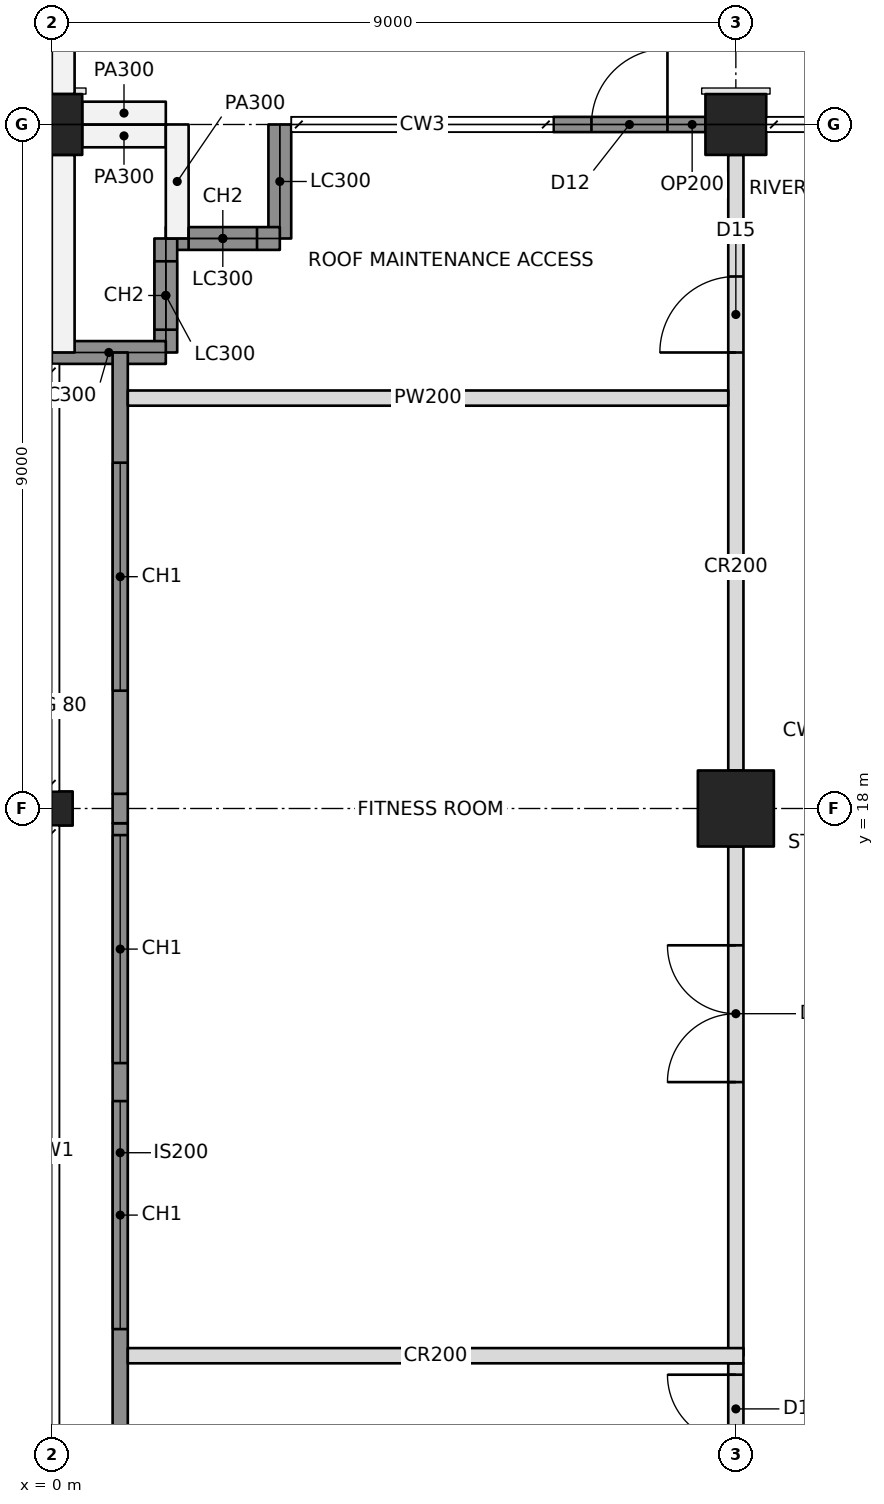
"""IFC4 building model, lengths in metres.
Left out: names, types, materials, properties, quantities, classifications, styles, units other than length and angle.
Written with IfcOpenShell. Run it as: python <this file> out.ifc"""

import sys

from ifc_helpers import new_model, si_unit, direction, frame, frame_2d, origin, origin_2d, place, context, subcontext, project, spatial, rectangle, hollow_rectangle, i_section, extrude, element, fill, save


model = new_model("IFC4")
c1 = context("Model", 3, precision=1e-05, world=origin(), true_north=direction((0.0, 1.0)))
c2 = subcontext(c1, "Body", "Model", "MODEL_VIEW")
j1 = project(units=[si_unit("LENGTHUNIT", "METRE"), si_unit("PLANEANGLEUNIT", "RADIAN")], contexts=[c1])
p1 = place(None, origin())
s1 = spatial("IfcSite", under=j1, at=p1, CompositionType="ELEMENT")
p2 = place(p1, origin())
s2 = spatial("IfcBuilding", under=s1, at=p2, CompositionType="ELEMENT")
p3 = place(p2, frame((0.0, 0.0, 160.4)))
s3 = spatial("IfcBuildingStorey", under=s2, at=p3, CompositionType="ELEMENT", Elevation=160.4)
p4 = place(p3, frame((0.0, 18.0, 0.0), z_axis=(0.0, 0.0, 1.0), x_axis=(0.0, 1.0, 0.0)))
e1 = element("IfcColumn", 1, at=p4, inside=s3, PredefinedType="COLUMN", context=c2, shape_type="SweptSolid", body=[
    extrude(i_section(OverallWidth=0.449, OverallDepth=0.549, WebThickness=0.072, FlangeThickness=0.115, at=origin_2d()), origin(), (0.0, 0.0, 1.0), 3.4),
])
p5 = place(p3, frame((0.0, 27.0, 0.0), z_axis=(0.0, 0.0, 1.0), x_axis=(0.0, 1.0, 0.0)))
e2 = element("IfcColumn", 2, at=p5, inside=s3, PredefinedType="COLUMN", context=c2, shape_type="SweptSolid", body=[
    extrude(hollow_rectangle(XDim=0.8, YDim=0.8, WallThickness=0.07, at=origin_2d()), origin(), (0.0, 0.0, 1.0), 3.4),
])
p6 = place(p3, frame((9.0, 18.0, 0.0), z_axis=(0.0, 0.0, 1.0), x_axis=(1.0, 0.0, 0.0)))
e3 = element("IfcColumn", 3, at=p6, inside=s3, PredefinedType="COLUMN", context=c2, shape_type="SweptSolid", body=[
    extrude(hollow_rectangle(XDim=1.0, YDim=1.0, WallThickness=0.1, at=origin_2d()), origin(), (0.0, 0.0, 1.0), 3.4),
])
p7 = place(p3, frame((9.0, 27.0, 0.0), z_axis=(0.0, 0.0, 1.0), x_axis=(1.0, 0.0, 0.0)))
e4 = element("IfcColumn", 4, at=p7, inside=s3, PredefinedType="COLUMN", context=c2, shape_type="SweptSolid", body=[
    extrude(hollow_rectangle(XDim=0.8, YDim=0.8, WallThickness=0.07, at=origin_2d()), origin(), (0.0, 0.0, 1.0), 3.4),
])
p8 = place(p3, frame((3.0, 27.0, 0.0), z_axis=(0.0, 0.0, 1.0), x_axis=(0.0, -1.0, 0.0)))
e5 = element("IfcWall", 5, at=p8, inside=s3, PredefinedType="SOLIDWALL", context=c2, shape_type="SweptSolid", body=[
    extrude(rectangle(XDim=1.5, YDim=0.3, at=frame_2d((0.75, 0.0))), origin(), (0.0, 0.0, 1.0), 2.42),
])
p9 = place(p3, frame((3.0, 25.5, 0.0), z_axis=(0.0, 0.0, 1.0), x_axis=(-1.0, 0.0, 0.0)))
e6 = element("IfcWall", 6, at=p9, inside=s3, PredefinedType="SOLIDWALL", context=c2, shape_type="SweptSolid", body=[
    extrude(rectangle(XDim=1.5, YDim=0.3, at=frame_2d((0.75, 0.0))), origin(), (0.0, 0.0, 1.0), 3.2),
])
p10 = place(p9, frame((0.3, 0.0, 0.6)))
e7 = element("IfcOpeningElement", 7, at=p10, cuts=e6, PredefinedType="OPENING", context=c2, shape_type="SweptSolid", body=[
    extrude(rectangle(XDim=0.9, YDim=2.2, at=frame_2d((0.45, 1.1))), frame((0.0, 0.16, 0.0), z_axis=(0.0, -1.0, 0.0), x_axis=(1.0, 0.0, 0.0)), (0.0, 0.0, 1.0), 0.32),
])
p11 = place(p3, frame((1.5, 25.5, 0.0), z_axis=(0.0, 0.0, 1.0), x_axis=(0.0, -1.0, 0.0)))
e8 = element("IfcWall", 8, at=p11, inside=s3, PredefinedType="SOLIDWALL", context=c2, shape_type="SweptSolid", body=[
    extrude(rectangle(XDim=1.5, YDim=0.3, at=frame_2d((0.75, 0.0))), origin(), (0.0, 0.0, 1.0), 3.2),
])
p12 = place(p11, frame((0.3, 0.0, 0.6)))
e9 = element("IfcOpeningElement", 9, at=p12, cuts=e8, PredefinedType="OPENING", context=c2, shape_type="SweptSolid", body=[
    extrude(rectangle(XDim=0.9, YDim=2.2, at=frame_2d((0.45, 1.1))), frame((0.0, 0.16, 0.0), z_axis=(0.0, -1.0, 0.0), x_axis=(1.0, 0.0, 0.0)), (0.0, 0.0, 1.0), 0.32),
])
p13 = place(p3, frame((1.5, 24.0, 0.0), z_axis=(0.0, 0.0, 1.0), x_axis=(-1.0, 0.0, 0.0)))
e10 = element("IfcWall", 10, at=p13, inside=s3, PredefinedType="SOLIDWALL", context=c2, shape_type="SweptSolid", body=[
    extrude(rectangle(XDim=1.5, YDim=0.3, at=frame_2d((0.75, 0.0))), origin(), (0.0, 0.0, 1.0), 2.42),
])
p14 = place(p3, frame((6.6, 27.0, 0.0), z_axis=(0.0, 0.0, 1.0), x_axis=(1.0, 0.0, 0.0)))
e11 = element("IfcWall", 11, at=p14, inside=s3, PredefinedType="SOLIDWALL", context=c2, shape_type="SweptSolid", body=[
    extrude(rectangle(XDim=2.0, YDim=0.2, at=frame_2d((1.0, 0.0))), origin(), (0.0, 0.0, 1.0), 2.42),
])
p15 = place(p14, frame((0.5, 0.0, 0.0)))
e12 = element("IfcOpeningElement", 12, at=p15, cuts=e11, PredefinedType="OPENING", context=c2, shape_type="SweptSolid", body=[
    extrude(rectangle(XDim=1.0, YDim=2.1, at=frame_2d((0.5, 1.05))), frame((0.0, 0.11, 0.0), z_axis=(0.0, -1.0, 0.0), x_axis=(1.0, 0.0, 0.0)), (0.0, 0.0, 1.0), 0.22),
])
p16 = place(p3, frame((0.15, 24.0, 0.0), z_axis=(0.0, 0.0, 1.0), x_axis=(0.0, 1.0, 0.0)))
e13 = element("IfcWall", 13, at=p16, inside=s3, PredefinedType="PARAPET", context=c2, shape_type="SweptSolid", body=[
    extrude(rectangle(XDim=2.6, YDim=0.3, at=frame_2d((1.3, 0.0))), origin(), (0.0, 0.0, 1.0), 1.1),
])
p17 = place(p3, frame((0.4, 26.85, 0.0), z_axis=(0.0, 0.0, 1.0), x_axis=(1.0, 0.0, 0.0)))
e14 = element("IfcWall", 14, at=p17, inside=s3, PredefinedType="PARAPET", context=c2, shape_type="SweptSolid", body=[
    extrude(rectangle(XDim=1.1, YDim=0.3, at=frame_2d((0.55, 0.0))), origin(), (0.0, 0.0, 1.0), 1.1),
])
p18 = place(p3, frame((1.65, 25.5, 0.0), z_axis=(0.0, 0.0, 1.0), x_axis=(0.0, 1.0, 0.0)))
e15 = element("IfcWall", 15, at=p18, inside=s3, PredefinedType="PARAPET", context=c2, shape_type="SweptSolid", body=[
    extrude(rectangle(XDim=1.5, YDim=0.3, at=frame_2d((0.75, 0.0))), origin(), (0.0, 0.0, 1.0), 1.1),
])
p19 = place(p3, frame((1.5, 27.15, 0.0), z_axis=(0.0, 0.0, 1.0), x_axis=(-1.0, 0.0, 0.0)))
e16 = element("IfcWall", 16, at=p19, inside=s3, PredefinedType="PARAPET", context=c2, shape_type="SweptSolid", body=[
    extrude(rectangle(XDim=1.1, YDim=0.3, at=frame_2d((0.55, 0.0))), origin(), (0.0, 0.0, 1.0), 1.1),
])
p20 = place(p3, frame((0.15, 27.4, 0.0), z_axis=(0.0, 0.0, 1.0), x_axis=(0.0, 1.0, 0.0)))
e17 = element("IfcWall", 17, at=p20, inside=s3, PredefinedType="PARAPET", context=c2, shape_type="SweptSolid", body=[
    extrude(rectangle(XDim=5.6, YDim=0.3, at=frame_2d((2.8, 0.0))), origin(), (0.0, 0.0, 1.0), 1.1),
])
p21 = place(p3, frame((9.0, 10.8, 0.0), z_axis=(0.0, 0.0, 1.0), x_axis=(0.0, 1.0, 0.0)))
e18 = element("IfcWall", 18, at=p21, inside=s3, PredefinedType="PARTITIONING", context=c2, shape_type="SweptSolid", body=[
    extrude(rectangle(XDim=6.7, YDim=0.2, at=frame_2d((3.35, 0.0))), origin(), (0.0, 0.0, 1.0), 2.405),
])
p22 = place(p21, frame((3.6, 0.0, 0.0)))
e19 = element("IfcOpeningElement", 19, at=p22, cuts=e18, PredefinedType="OPENING", context=c2, shape_type="SweptSolid", body=[
    extrude(rectangle(XDim=1.8, YDim=2.4, at=frame_2d((0.9, 1.2))), frame((0.0, 0.11, 0.0), z_axis=(0.0, -1.0, 0.0), x_axis=(1.0, 0.0, 0.0)), (0.0, 0.0, 1.0), 0.22),
])
p23 = place(p3, frame((9.0, 18.5, 0.0), z_axis=(0.0, 0.0, 1.0), x_axis=(0.0, 1.0, 0.0)))
e20 = element("IfcWall", 20, at=p23, inside=s3, PredefinedType="PARTITIONING", context=c2, shape_type="SweptSolid", body=[
    extrude(rectangle(XDim=8.1, YDim=0.2, at=frame_2d((4.05, 0.0))), origin(), (0.0, 0.0, 1.0), 2.405),
])
p24 = place(p23, frame((5.5, 0.0, 0.0)))
e21 = element("IfcOpeningElement", 21, at=p24, cuts=e20, PredefinedType="OPENING", context=c2, shape_type="SweptSolid", body=[
    extrude(rectangle(XDim=1.0, YDim=2.1, at=frame_2d((0.5, 1.05))), frame((0.0, 0.11, 0.0), z_axis=(0.0, -1.0, 0.0), x_axis=(1.0, 0.0, 0.0)), (0.0, 0.0, 1.0), 0.22),
])
p25 = place(p3, frame((1.0, 10.8, 0.0), z_axis=(0.0, 0.0, 1.0), x_axis=(1.0, 0.0, 0.0)))
e22 = element("IfcWall", 22, at=p25, inside=s3, PredefinedType="PARTITIONING", context=c2, shape_type="SweptSolid", body=[
    extrude(rectangle(XDim=8.1, YDim=0.2, at=frame_2d((4.05, 0.0))), origin(), (0.0, 0.0, 1.0), 2.404),
])
p26 = place(p3, frame((9.0, 9.5, 0.0), z_axis=(0.0, 0.0, 1.0), x_axis=(0.0, 1.0, 0.0)))
e23 = element("IfcWall", 23, at=p26, inside=s3, PredefinedType="PARTITIONING", context=c2, shape_type="SweptSolid", body=[
    extrude(rectangle(XDim=1.2, YDim=0.2, at=frame_2d((0.6, 0.0))), origin(), (0.0, 0.0, 1.0), 2.405),
])
p27 = place(p26, frame((0.15, 0.0, 0.0)))
e24 = element("IfcOpeningElement", 24, at=p27, cuts=e23, PredefinedType="OPENING", context=c2, shape_type="SweptSolid", body=[
    extrude(rectangle(XDim=0.9, YDim=2.1, at=frame_2d((0.45, 1.05))), frame((0.0, 0.11, 0.0), z_axis=(0.0, -1.0, 0.0), x_axis=(1.0, 0.0, 0.0)), (0.0, 0.0, 1.0), 0.22),
])
p28 = place(p3, frame((8.9, 23.4, 0.0), z_axis=(0.0, 0.0, 1.0), x_axis=(-1.0, 0.0, 0.0)))
e25 = element("IfcWall", 25, at=p28, inside=s3, PredefinedType="PARTITIONING", context=c2, shape_type="SweptSolid", body=[
    extrude(rectangle(XDim=7.9, YDim=0.2, at=frame_2d((3.95, 0.0))), origin(), (0.0, 0.0, 1.0), 2.404),
])
p29 = place(p3, frame((0.9, 9.135, 0.0), z_axis=(0.0, 0.0, 1.0), x_axis=(0.0, 1.0, 0.0)))
e26 = element("IfcWall", 26, at=p29, inside=s3, PredefinedType="SOLIDWALL", context=c2, shape_type="SweptSolid", body=[
    extrude(rectangle(XDim=8.671, YDim=0.2, at=frame_2d((4.335, 0.0))), origin(), (0.0, 0.0, 1.0), 3.2),
])
p30 = place(p29, frame((2.015, 0.0, 0.6)))
e27 = element("IfcOpeningElement", 27, at=p30, cuts=e26, PredefinedType="OPENING", context=c2, shape_type="SweptSolid", body=[
    extrude(rectangle(XDim=3.0, YDim=2.2, at=frame_2d((1.5, 1.1))), frame((0.0, 0.11, 0.0), z_axis=(0.0, -1.0, 0.0), x_axis=(1.0, 0.0, 0.0)), (0.0, 0.0, 1.0), 0.22),
])
p31 = place(p29, frame((5.515, 0.0, 0.6)))
e28 = element("IfcOpeningElement", 28, at=p31, cuts=e26, PredefinedType="OPENING", context=c2, shape_type="SweptSolid", body=[
    extrude(rectangle(XDim=3.0, YDim=2.2, at=frame_2d((1.5, 1.1))), frame((0.0, 0.11, 0.0), z_axis=(0.0, -1.0, 0.0), x_axis=(1.0, 0.0, 0.0)), (0.0, 0.0, 1.0), 0.22),
])
p32 = place(p3, frame((0.9, 17.806, 0.0), z_axis=(0.0, 0.0, 1.0), x_axis=(0.0, 1.0, 0.0)))
e29 = element("IfcWall", 29, at=p32, inside=s3, PredefinedType="SOLIDWALL", context=c2, shape_type="SweptSolid", body=[
    extrude(rectangle(XDim=0.388, YDim=0.2, at=frame_2d((0.194, 0.0))), origin(), (0.0, 0.0, 1.0), 2.404),
])
p33 = place(p3, frame((0.9, 18.194, 0.0), z_axis=(0.0, 0.0, 1.0), x_axis=(0.0, 1.0, 0.0)))
e30 = element("IfcWall", 30, at=p33, inside=s3, PredefinedType="SOLIDWALL", context=c2, shape_type="SweptSolid", body=[
    extrude(rectangle(XDim=5.806, YDim=0.2, at=frame_2d((2.903, 0.0))), origin(), (0.0, 0.0, 1.0), 3.2),
])
p34 = place(p33, frame((1.356, 0.0, 0.6)))
e31 = element("IfcOpeningElement", 31, at=p34, cuts=e30, PredefinedType="OPENING", context=c2, shape_type="SweptSolid", body=[
    extrude(rectangle(XDim=3.0, YDim=2.2, at=frame_2d((1.5, 1.1))), frame((0.0, 0.11, 0.0), z_axis=(0.0, -1.0, 0.0), x_axis=(1.0, 0.0, 0.0)), (0.0, 0.0, 1.0), 0.22),
])
p35 = place(p10, origin())
e32 = element("IfcWindow", 32, at=p35, inside=s3, PartitioningType="SINGLE_PANEL", PredefinedType="WINDOW", context=c2, shape_type="SweptSolid", body=[
    extrude(rectangle(XDim=0.9, YDim=2.2, at=frame_2d((0.45, 1.1))), frame((0.0, 0.03, 0.0), z_axis=(0.0, -1.0, 0.0), x_axis=(1.0, 0.0, 0.0)), (0.0, 0.0, 1.0), 0.06),
])
fill(e7, e32)
p36 = place(p12, origin())
e33 = element("IfcWindow", 33, at=p36, inside=s3, PartitioningType="SINGLE_PANEL", PredefinedType="WINDOW", context=c2, shape_type="SweptSolid", body=[
    extrude(rectangle(XDim=0.9, YDim=2.2, at=frame_2d((0.45, 1.1))), frame((0.0, 0.03, 0.0), z_axis=(0.0, -1.0, 0.0), x_axis=(1.0, 0.0, 0.0)), (0.0, 0.0, 1.0), 0.06),
])
fill(e9, e33)
p37 = place(p30, origin())
e34 = element("IfcWindow", 34, at=p37, inside=s3, PartitioningType="TRIPLE_PANEL_VERTICAL", PredefinedType="WINDOW", context=c2, shape_type="SweptSolid", body=[
    extrude(rectangle(XDim=3.0, YDim=2.2, at=frame_2d((1.5, 1.1))), frame((0.0, 0.03, 0.0), z_axis=(0.0, -1.0, 0.0), x_axis=(1.0, 0.0, 0.0)), (0.0, 0.0, 1.0), 0.06),
])
fill(e27, e34)
p38 = place(p31, origin())
e35 = element("IfcWindow", 35, at=p38, inside=s3, PartitioningType="TRIPLE_PANEL_VERTICAL", PredefinedType="WINDOW", context=c2, shape_type="SweptSolid", body=[
    extrude(rectangle(XDim=3.0, YDim=2.2, at=frame_2d((1.5, 1.1))), frame((0.0, 0.03, 0.0), z_axis=(0.0, -1.0, 0.0), x_axis=(1.0, 0.0, 0.0)), (0.0, 0.0, 1.0), 0.06),
])
fill(e28, e35)
p39 = place(p34, origin())
e36 = element("IfcWindow", 36, at=p39, inside=s3, PartitioningType="TRIPLE_PANEL_VERTICAL", PredefinedType="WINDOW", context=c2, shape_type="SweptSolid", body=[
    extrude(rectangle(XDim=3.0, YDim=2.2, at=frame_2d((1.5, 1.1))), frame((0.0, 0.03, 0.0), z_axis=(0.0, -1.0, 0.0), x_axis=(1.0, 0.0, 0.0)), (0.0, 0.0, 1.0), 0.06),
])
fill(e31, e36)
p40 = place(p15, origin())
e37 = element("IfcDoor", 37, at=p40, inside=s3, OperationType="SINGLE_SWING_RIGHT", PredefinedType="DOOR", context=c2, shape_type="SweptSolid", body=[
    extrude(rectangle(XDim=1.0, YDim=2.1, at=frame_2d((0.5, 1.05))), frame((0.0, 0.025, 0.0), z_axis=(0.0, -1.0, 0.0), x_axis=(1.0, 0.0, 0.0)), (0.0, 0.0, 1.0), 0.05),
])
fill(e12, e37)
p41 = place(p22, origin())
e38 = element("IfcDoor", 38, at=p41, inside=s3, OperationType="DOUBLE_DOOR_SINGLE_SWING", PredefinedType="DOOR", context=c2, shape_type="SweptSolid", body=[
    extrude(rectangle(XDim=1.8, YDim=2.4, at=frame_2d((0.9, 1.2))), frame((0.0, 0.025, 0.0), z_axis=(0.0, -1.0, 0.0), x_axis=(1.0, 0.0, 0.0)), (0.0, 0.0, 1.0), 0.05),
])
fill(e19, e38)
p42 = place(p27, origin())
e39 = element("IfcDoor", 39, at=p42, inside=s3, OperationType="SINGLE_SWING_RIGHT", PredefinedType="DOOR", context=c2, shape_type="SweptSolid", body=[
    extrude(rectangle(XDim=0.9, YDim=2.1, at=frame_2d((0.45, 1.05))), frame((0.0, 0.025, 0.0), z_axis=(0.0, -1.0, 0.0), x_axis=(1.0, 0.0, 0.0)), (0.0, 0.0, 1.0), 0.05),
])
fill(e24, e39)
p43 = place(p24, origin())
e40 = element("IfcDoor", 40, at=p43, inside=s3, OperationType="SINGLE_SWING_LEFT", PredefinedType="DOOR", context=c2, shape_type="SweptSolid", body=[
    extrude(rectangle(XDim=1.0, YDim=2.1, at=frame_2d((0.5, 1.05))), frame((0.0, 0.025, 0.0), z_axis=(0.0, -1.0, 0.0), x_axis=(1.0, 0.0, 0.0)), (0.0, 0.0, 1.0), 0.05),
])
fill(e21, e40)
save(model, sys.argv[1])
